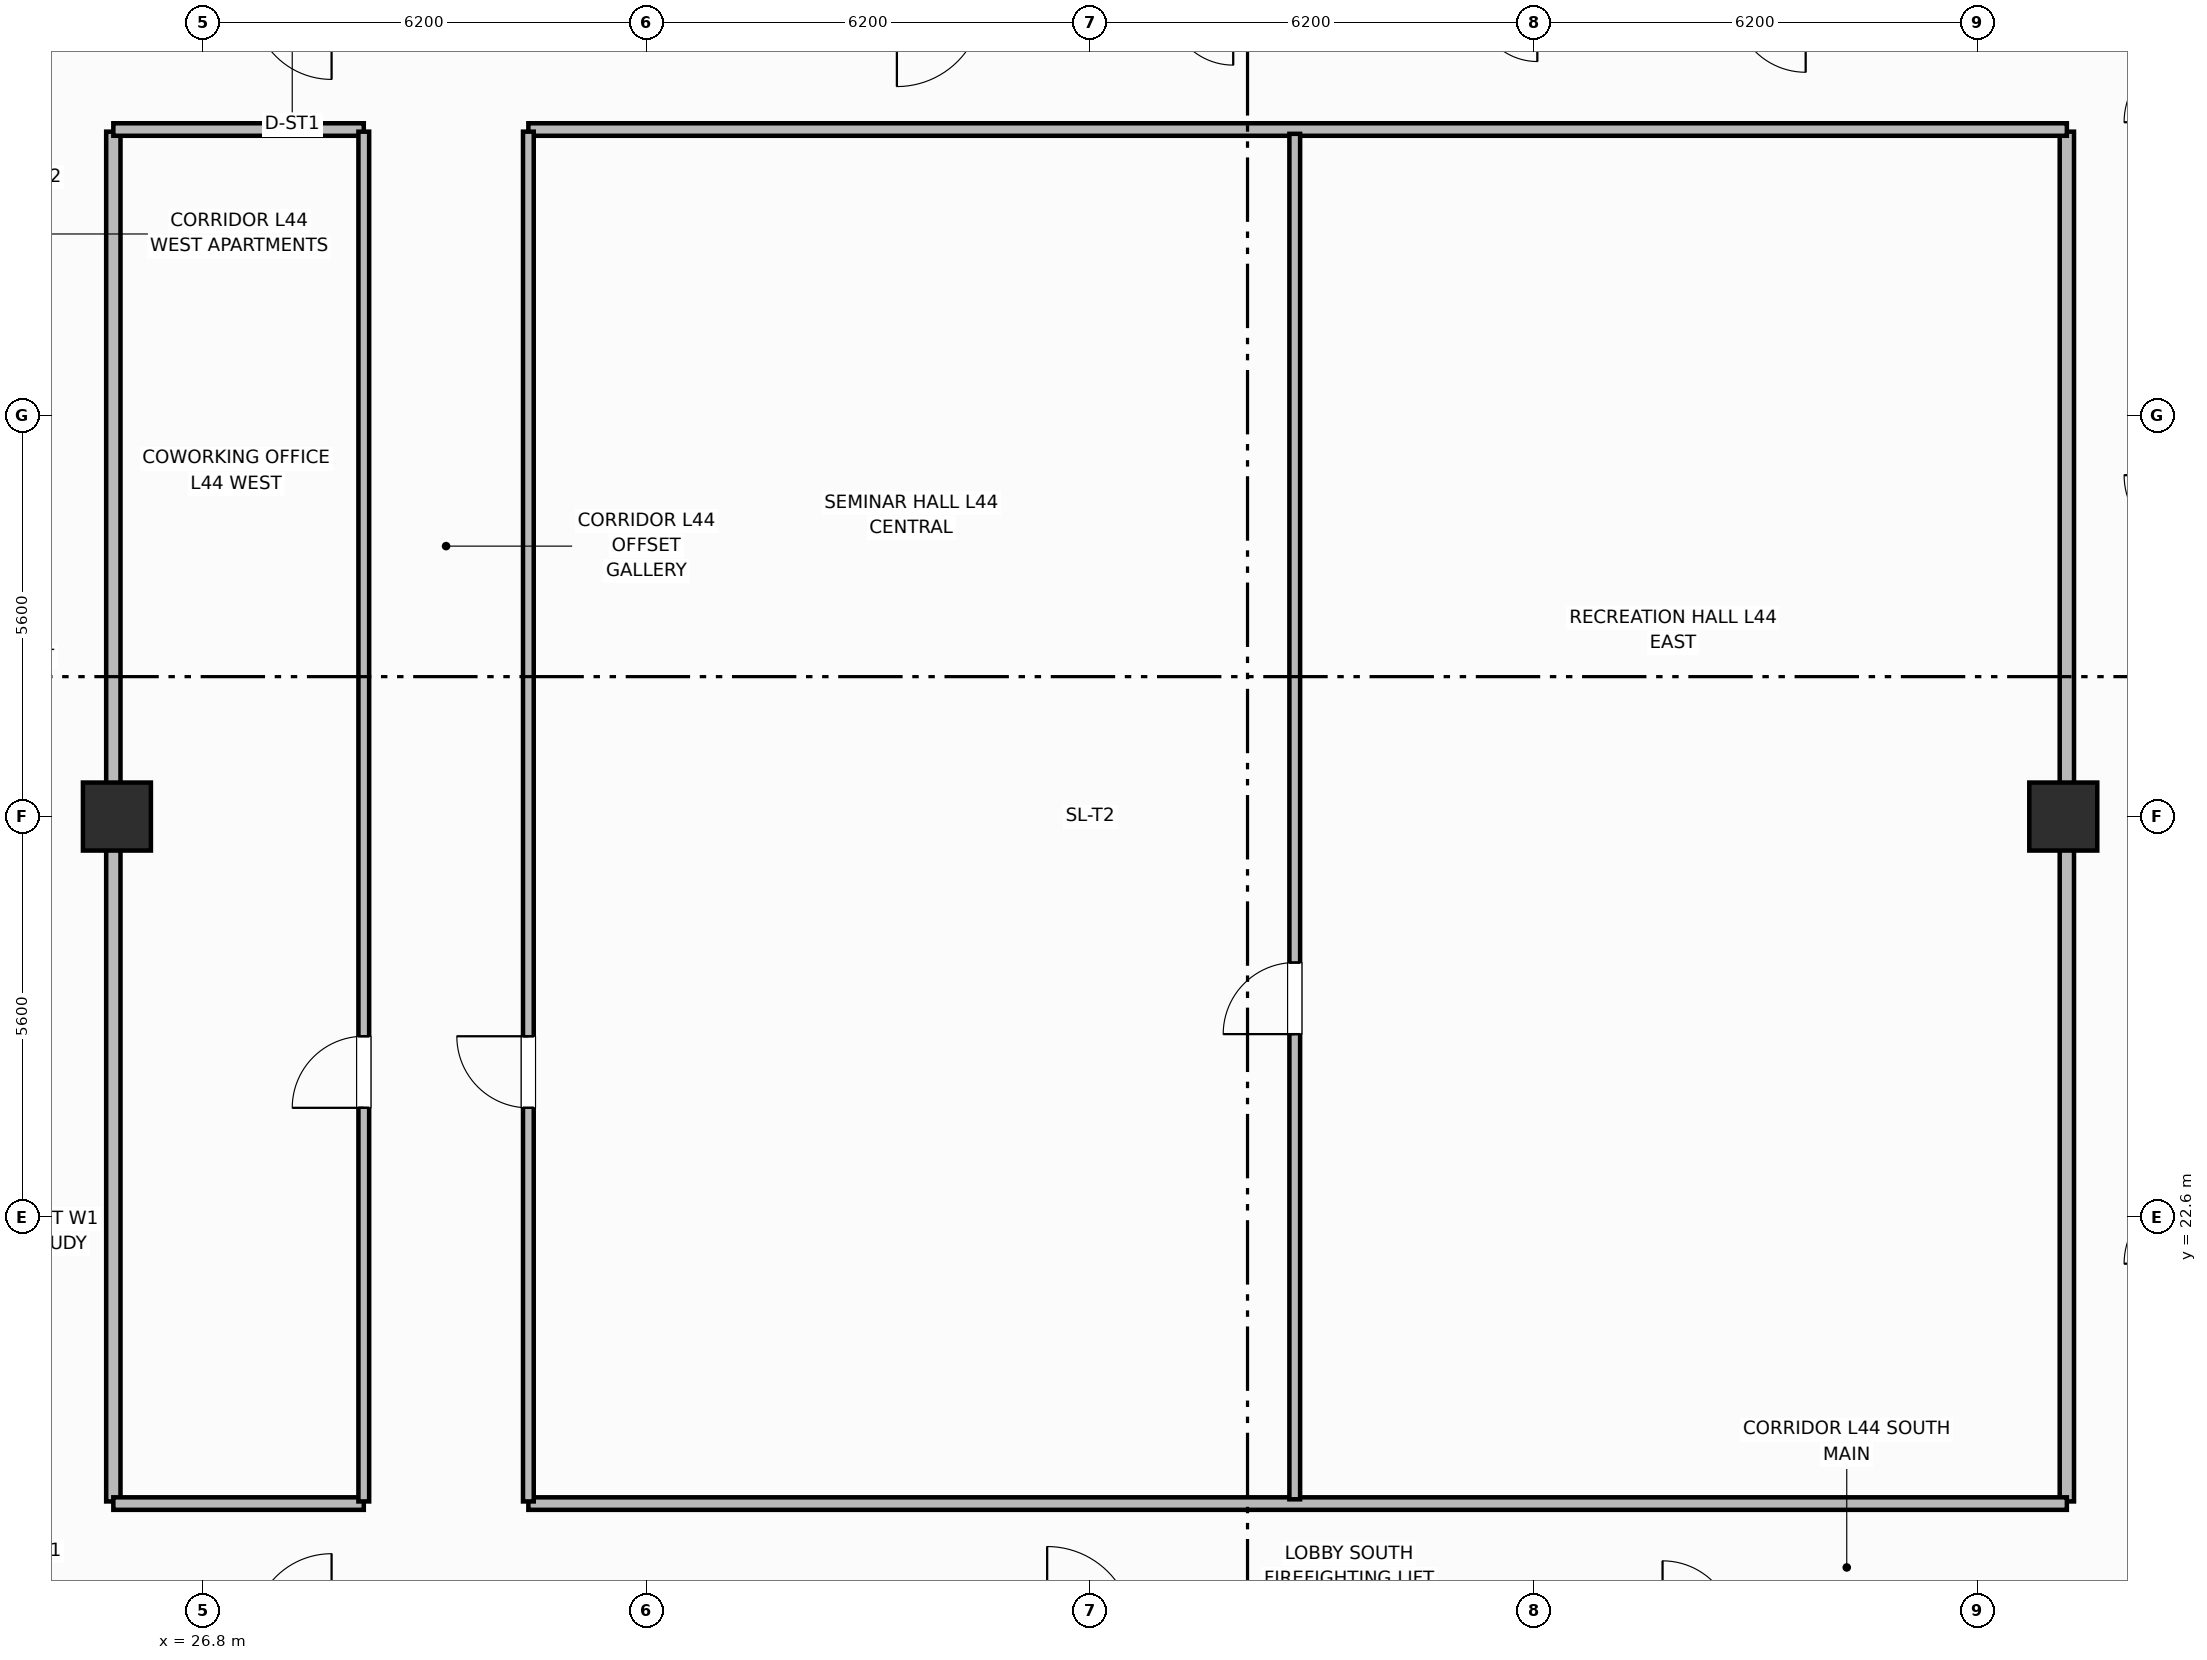
"""IFC4 building model, lengths in metres.
Left out: names, types, materials, properties, quantities, classifications, styles, units other than length and angle.
Written with IfcOpenShell. Run it as: python <this file> out.ifc"""

import sys

from ifc_helpers import new_model, si_unit, direction, frame, frame_2d, origin, origin_2d, place, context, subcontext, project, spatial, rectangle, extrude, element, fill, save


model = new_model("IFC4")
c1 = context("Model", 3, precision=1e-05, world=origin(), true_north=direction((0.0, 1.0)))
c2 = subcontext(c1, "Body", "Model", "MODEL_VIEW")
j1 = project(units=[si_unit("LENGTHUNIT", "METRE"), si_unit("PLANEANGLEUNIT", "RADIAN")], contexts=[c1])
p1 = place(None, origin())
s1 = spatial("IfcSite", under=j1, at=p1, CompositionType="ELEMENT")
p2 = place(p1, origin())
s2 = spatial("IfcBuilding", under=s1, at=p2, CompositionType="ELEMENT")
p3 = place(p2, frame((0.0, 0.0, 177.4)))
s3 = spatial("IfcBuildingStorey", under=s2, at=p3, CompositionType="ELEMENT", Elevation=177.4)
for number, where, z_axis, x_axis in (
    (1, (25.6, 28.2, 0.0), (0.0, 0.0, 1.0), (1.0, 0.0, 0.0)),
    (2, (52.8, 28.2, 0.0), (0.0, 0.0, 1.0), (1.0, 0.0, 0.0)),
):
    element("IfcColumn", number, at=place(p3, frame(where, z_axis=z_axis, x_axis=x_axis)), inside=s3, PredefinedType="COLUMN", context=c2, shape_type="SweptSolid", body=[
        extrude(rectangle(XDim=0.95, YDim=0.95, at=origin_2d()), origin(), (0.0, 0.0, 1.0), 3.7),
    ])
for number, where, z_axis, x_axis in (
    (3, (25.55, 18.63, 0.0), (0.0, 0.0, 1.0), (0.0, 1.0, 0.0)),
    (4, (52.85, 18.63, 0.0), (0.0, 0.0, 1.0), (0.0, 1.0, 0.0)),
):
    element("IfcWall", number, at=place(p3, frame(where, z_axis=z_axis, x_axis=x_axis)), inside=s3, PredefinedType="PARTITIONING", context=c2, shape_type="SweptSolid", body=[
        extrude(rectangle(XDim=19.14, YDim=0.2, at=frame_2d((9.57, 0.0))), origin(), (0.0, 0.0, 1.0), 2.55),
    ])
p4 = place(p3, frame((25.55, 18.6, 0.0), z_axis=(0.0, 0.0, 1.0), x_axis=(1.0, 0.0, 0.0)))
e5 = element("IfcWall", 5, at=p4, inside=s3, PredefinedType="PARTITIONING", context=c2, shape_type="SweptSolid", body=[
    extrude(rectangle(XDim=3.5, YDim=0.175, at=frame_2d((1.75, 0.0))), origin(), (0.0, 0.0, 1.0), 2.55),
])
p5 = place(p3, frame((31.35, 18.6, 0.0), z_axis=(0.0, 0.0, 1.0), x_axis=(1.0, 0.0, 0.0)))
e6 = element("IfcWall", 6, at=p5, inside=s3, PredefinedType="PARTITIONING", context=c2, shape_type="SweptSolid", body=[
    extrude(rectangle(XDim=21.5, YDim=0.175, at=frame_2d((10.75, 0.0))), origin(), (0.0, 0.0, 1.0), 2.55),
])
p6 = place(p3, frame((25.55, 37.8, 0.0), z_axis=(0.0, 0.0, 1.0), x_axis=(1.0, 0.0, 0.0)))
e7 = element("IfcWall", 7, at=p6, inside=s3, PredefinedType="PARTITIONING", context=c2, shape_type="SweptSolid", body=[
    extrude(rectangle(XDim=3.5, YDim=0.175, at=frame_2d((1.75, 0.0))), origin(), (0.0, 0.0, 1.0), 2.55),
])
p7 = place(p3, frame((31.35, 37.8, 0.0), z_axis=(0.0, 0.0, 1.0), x_axis=(1.0, 0.0, 0.0)))
e8 = element("IfcWall", 8, at=p7, inside=s3, PredefinedType="PARTITIONING", context=c2, shape_type="SweptSolid", body=[
    extrude(rectangle(XDim=21.5, YDim=0.175, at=frame_2d((10.75, 0.0))), origin(), (0.0, 0.0, 1.0), 2.55),
])
p8 = place(p3, frame((42.06, 18.66, 0.0), z_axis=(0.0, 0.0, 1.0), x_axis=(0.0, 1.0, 0.0)))
e9 = element("IfcWall", 9, at=p8, inside=s3, PredefinedType="PARTITIONING", context=c2, shape_type="SweptSolid", body=[
    extrude(rectangle(XDim=19.08, YDim=0.15, at=frame_2d((9.54, 0.0))), origin(), (0.0, 0.0, 1.0), 2.55),
])
p9 = place(p8, frame((6.5, 0.0, 0.0)))
e10 = element("IfcOpeningElement", 10, at=p9, cuts=e9, PredefinedType="OPENING", context=c2, shape_type="SweptSolid", body=[
    extrude(rectangle(XDim=1.0, YDim=2.15, at=frame_2d((0.5, 1.075))), frame((0.0, 0.085, 0.0), z_axis=(0.0, -1.0, 0.0), x_axis=(1.0, 0.0, 0.0)), (0.0, 0.0, 1.0), 0.17),
])
p10 = place(p3, frame((29.05, 18.63, 0.0), z_axis=(0.0, 0.0, 1.0), x_axis=(0.0, 1.0, 0.0)))
e11 = element("IfcWall", 11, at=p10, inside=s3, PredefinedType="PARTITIONING", context=c2, shape_type="SweptSolid", body=[
    extrude(rectangle(XDim=19.14, YDim=0.15, at=frame_2d((9.57, 0.0))), origin(), (0.0, 0.0, 1.0), 2.55),
])
p11 = place(p10, frame((5.5, 0.0, 0.0)))
e12 = element("IfcOpeningElement", 12, at=p11, cuts=e11, PredefinedType="OPENING", context=c2, shape_type="SweptSolid", body=[
    extrude(rectangle(XDim=1.0, YDim=2.15, at=frame_2d((0.5, 1.075))), frame((0.0, 0.085, 0.0), z_axis=(0.0, -1.0, 0.0), x_axis=(1.0, 0.0, 0.0)), (0.0, 0.0, 1.0), 0.17),
])
p12 = place(p3, frame((31.35, 18.63, 0.0), z_axis=(0.0, 0.0, 1.0), x_axis=(0.0, 1.0, 0.0)))
e13 = element("IfcWall", 13, at=p12, inside=s3, PredefinedType="PARTITIONING", context=c2, shape_type="SweptSolid", body=[
    extrude(rectangle(XDim=19.14, YDim=0.15, at=frame_2d((9.57, 0.0))), origin(), (0.0, 0.0, 1.0), 2.55),
])
p13 = place(p12, frame((5.5, 0.0, 0.0)))
e14 = element("IfcOpeningElement", 14, at=p13, cuts=e13, PredefinedType="OPENING", context=c2, shape_type="SweptSolid", body=[
    extrude(rectangle(XDim=1.0, YDim=2.15, at=frame_2d((0.5, 1.075))), frame((0.0, 0.085, 0.0), z_axis=(0.0, -1.0, 0.0), x_axis=(1.0, 0.0, 0.0)), (0.0, 0.0, 1.0), 0.17),
])
p14 = place(p9, origin())
e15 = element("IfcDoor", 15, at=p14, inside=s3, OperationType="SINGLE_SWING_LEFT", PredefinedType="DOOR", context=c2, shape_type="SweptSolid", body=[
    extrude(rectangle(XDim=1.0, YDim=2.15, at=frame_2d((0.5, 1.075))), frame((0.0, 0.025, 0.0), z_axis=(0.0, -1.0, 0.0), x_axis=(1.0, 0.0, 0.0)), (0.0, 0.0, 1.0), 0.05),
])
fill(e10, e15)
p15 = place(p11, origin())
e16 = element("IfcDoor", 16, at=p15, inside=s3, OperationType="SINGLE_SWING_LEFT", PredefinedType="DOOR", context=c2, shape_type="SweptSolid", body=[
    extrude(rectangle(XDim=1.0, YDim=2.15, at=frame_2d((0.5, 1.075))), frame((0.0, 0.025, 0.0), z_axis=(0.0, -1.0, 0.0), x_axis=(1.0, 0.0, 0.0)), (0.0, 0.0, 1.0), 0.05),
])
fill(e12, e16)
p16 = place(p13, origin())
e17 = element("IfcDoor", 17, at=p16, inside=s3, OperationType="SINGLE_SWING_RIGHT", PredefinedType="DOOR", context=c2, shape_type="SweptSolid", body=[
    extrude(rectangle(XDim=1.0, YDim=2.15, at=frame_2d((0.5, 1.075))), frame((0.0, 0.025, 0.0), z_axis=(0.0, -1.0, 0.0), x_axis=(1.0, 0.0, 0.0)), (0.0, 0.0, 1.0), 0.05),
])
fill(e14, e17)
save(model, sys.argv[1])
